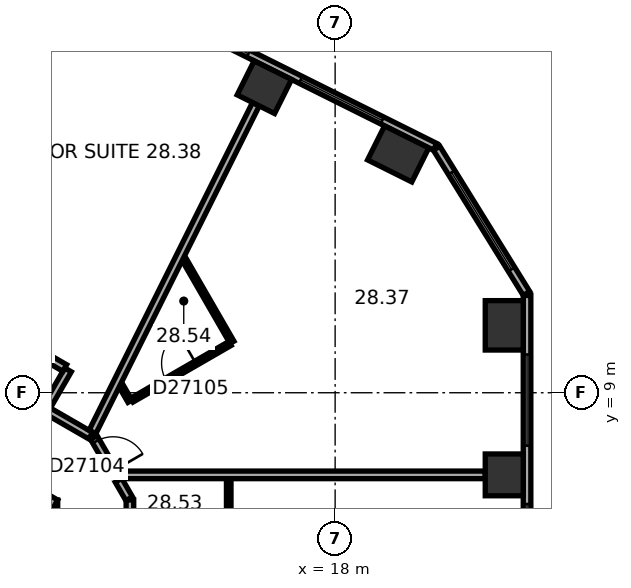
"""IFC4 building model, lengths in metres.
Left out: names, types, materials, properties, quantities, classifications, styles, units other than length and angle.
Written with IfcOpenShell. Run it as: python <this file> out.ifc"""

import sys

from ifc_helpers import new_model, si_unit, direction, frame, frame_2d, origin, origin_2d, place, context, subcontext, project, spatial, rectangle, extrude, element, fill, save


model = new_model("IFC4")
c1 = context("Model", 3, precision=1e-05, world=origin(), true_north=direction((0.0, 1.0)))
c2 = subcontext(c1, "Body", "Model", "MODEL_VIEW")
j1 = project(units=[si_unit("LENGTHUNIT", "METRE"), si_unit("PLANEANGLEUNIT", "RADIAN")], contexts=[c1])
p1 = place(None, origin())
s1 = spatial("IfcSite", under=j1, at=p1, CompositionType="ELEMENT")
p2 = place(p1, origin())
s2 = spatial("IfcBuilding", under=s1, at=p2, CompositionType="ELEMENT")
p3 = place(p2, frame((0.0, 0.0, 116.6)))
s3 = spatial("IfcBuildingStorey", under=s2, at=p3, CompositionType="ELEMENT", Elevation=116.6)
p4 = place(p3, frame((22.45, 6.839, 0.0), z_axis=(0.0, 0.0, 1.0), x_axis=(0.0, 1.0, 0.0)))
e1 = element("IfcColumn", 1, at=p4, inside=s3, PredefinedType="COLUMN", context=c2, shape_type="SweptSolid", body=[
    extrude(rectangle(XDim=1.1, YDim=1.0, at=origin_2d()), origin(), (0.0, 0.0, 1.0), 3.3),
])
for number, where, z_axis, x_axis in (
    (2, (22.45, 10.774, 0.0), (0.0, 0.0, 1.0), (0.0, 1.0, 0.0)),
    (3, (19.659, 15.284, 0.0), (0.0, 0.0, 1.0), (-0.895, 0.446, 0.0)),
):
    element("IfcColumn", number, at=place(p3, frame(where, z_axis=z_axis, x_axis=x_axis)), inside=s3, PredefinedType="COLUMN", context=c2, shape_type="SweptSolid", body=[
        extrude(rectangle(XDim=1.3, YDim=1.0, at=origin_2d()), origin(), (0.0, 0.0, 1.0), 3.3),
    ])
p5 = place(p3, frame((16.138, 17.04, 0.0), z_axis=(0.0, 0.0, 1.0), x_axis=(-0.894934361602, 0.44619781311, 0.0)))
e4 = element("IfcColumn", 4, at=p5, inside=s3, PredefinedType="COLUMN", context=c2, shape_type="SweptSolid", body=[
    extrude(rectangle(XDim=1.1, YDim=1.0, at=origin_2d()), origin(), (0.0, 0.0, 1.0), 3.3),
])
p6 = place(p3, frame((10.1, -6.177, 0.0), z_axis=(0.0, 0.0, 1.0), x_axis=(0.0, 1.0, 0.0)))
e5 = element("IfcWall", 5, at=p6, inside=s3, PredefinedType="SHEAR", context=c2, shape_type="SweptSolid", body=[
    extrude(rectangle(XDim=12.355, YDim=1.2, at=frame_2d((6.177, 0.0))), origin(), (0.0, 0.0, 1.0), 3.3),
])
p7 = place(p6, frame((6.378, 0.0, 0.0)))
e6 = element("IfcOpeningElement", 6, at=p7, cuts=e5, PredefinedType="OPENING", context=c2, shape_type="SweptSolid", body=[
    extrude(rectangle(XDim=1.5, YDim=2.1, at=frame_2d((0.75, 1.05))), frame((0.0, 0.61, 0.0), z_axis=(0.0, -1.0, 0.0), x_axis=(1.0, 0.0, 0.0)), (0.0, 0.0, 1.0), 1.22),
])
p8 = place(p6, frame((1.828, 0.0, 0.0)))
e7 = element("IfcOpeningElement", 7, at=p8, cuts=e5, PredefinedType="OPENING", context=c2, shape_type="SweptSolid", body=[
    extrude(rectangle(XDim=1.1, YDim=2.1, at=frame_2d((0.55, 1.05))), frame((0.0, 0.61, 0.0), z_axis=(0.0, -1.0, 0.0), x_axis=(1.0, 0.0, 0.0)), (0.0, 0.0, 1.0), 1.22),
])
p9 = place(p6, frame((4.427, 0.0, 0.0)))
e8 = element("IfcOpeningElement", 8, at=p9, cuts=e5, PredefinedType="OPENING", context=c2, shape_type="SweptSolid", body=[
    extrude(rectangle(XDim=1.1, YDim=2.1, at=frame_2d((0.55, 1.05))), frame((0.0, 0.61, 0.0), z_axis=(0.0, -1.0, 0.0), x_axis=(1.0, 0.0, 0.0)), (0.0, 0.0, 1.0), 1.22),
])
p10 = place(p3, frame((10.4, 5.658, 0.0), z_axis=(0.0, 0.0, 1.0), x_axis=(-0.866021384402, 0.500006961711, 0.0)))
e9 = element("IfcWall", 9, at=p10, inside=s3, PredefinedType="SHEAR", context=c2, shape_type="SweptSolid", body=[
    extrude(rectangle(XDim=12.355, YDim=1.2, at=frame_2d((6.178, 0.0))), origin(), (0.0, 0.0, 1.0), 3.3),
])
p11 = place(p10, frame((2.728, 0.0, 0.0)))
e10 = element("IfcOpeningElement", 10, at=p11, cuts=e9, PredefinedType="OPENING", context=c2, shape_type="SweptSolid", body=[
    extrude(rectangle(XDim=1.1, YDim=2.1, at=frame_2d((0.55, 1.05))), frame((0.0, 0.61, 0.0), z_axis=(0.0, -1.0, 0.0), x_axis=(1.0, 0.0, 0.0)), (0.0, 0.0, 1.0), 1.22),
])
p12 = place(p10, frame((5.328, 0.0, 0.0)))
e11 = element("IfcOpeningElement", 11, at=p12, cuts=e9, PredefinedType="OPENING", context=c2, shape_type="SweptSolid", body=[
    extrude(rectangle(XDim=1.1, YDim=2.1, at=frame_2d((0.55, 1.05))), frame((0.0, 0.61, 0.0), z_axis=(0.0, -1.0, 0.0), x_axis=(1.0, 0.0, 0.0)), (0.0, 0.0, 1.0), 1.22),
])
p13 = place(p10, frame((7.928, 0.0, 0.0)))
e12 = element("IfcOpeningElement", 12, at=p13, cuts=e9, PredefinedType="OPENING", context=c2, shape_type="SweptSolid", body=[
    extrude(rectangle(XDim=1.1, YDim=2.1, at=frame_2d((0.55, 1.05))), frame((0.0, 0.61, 0.0), z_axis=(0.0, -1.0, 0.0), x_axis=(1.0, 0.0, 0.0)), (0.0, 0.0, 1.0), 1.22),
])
p14 = place(p3, frame((23.05, -9.687, 0.0), z_axis=(0.0, 0.0, 1.0), x_axis=(0.0, 1.0, 0.0)))
e13 = element("IfcWall", 13, at=p14, inside=s3, PredefinedType="STANDARD", context=c2, shape_type="SweptSolid", body=[
    extrude(rectangle(XDim=21.246, YDim=0.2, at=frame_2d((10.623, 0.0))), origin(), (0.0, 0.0, 1.0), 3.3),
])
p15 = place(p14, frame((1.555, 0.0, 0.8)))
e14 = element("IfcOpeningElement", 14, at=p15, cuts=e13, PredefinedType="OPENING", context=c2, shape_type="SweptSolid", body=[
    extrude(rectangle(XDim=2.4, YDim=1.7, at=frame_2d((1.2, 0.85))), frame((0.0, 0.11, 0.0), z_axis=(0.0, -1.0, 0.0), x_axis=(1.0, 0.0, 0.0)), (0.0, 0.0, 1.0), 0.22),
])
p16 = place(p14, frame((5.489, 0.0, 0.8)))
e15 = element("IfcOpeningElement", 15, at=p16, cuts=e13, PredefinedType="OPENING", context=c2, shape_type="SweptSolid", body=[
    extrude(rectangle(XDim=2.4, YDim=1.7, at=frame_2d((1.2, 0.85))), frame((0.0, 0.11, 0.0), z_axis=(0.0, -1.0, 0.0), x_axis=(1.0, 0.0, 0.0)), (0.0, 0.0, 1.0), 0.22),
])
p17 = place(p14, frame((9.424, 0.0, 0.8)))
e16 = element("IfcOpeningElement", 16, at=p17, cuts=e13, PredefinedType="OPENING", context=c2, shape_type="SweptSolid", body=[
    extrude(rectangle(XDim=2.4, YDim=1.7, at=frame_2d((1.2, 0.85))), frame((0.0, 0.11, 0.0), z_axis=(0.0, -1.0, 0.0), x_axis=(1.0, 0.0, 0.0)), (0.0, 0.0, 1.0), 0.22),
])
p18 = place(p14, frame((13.358, 0.0, 0.8)))
e17 = element("IfcOpeningElement", 17, at=p18, cuts=e13, PredefinedType="OPENING", context=c2, shape_type="SweptSolid", body=[
    extrude(rectangle(XDim=2.4, YDim=1.7, at=frame_2d((1.2, 0.85))), frame((0.0, 0.11, 0.0), z_axis=(0.0, -1.0, 0.0), x_axis=(1.0, 0.0, 0.0)), (0.0, 0.0, 1.0), 0.22),
])
p19 = place(p14, frame((17.293, 0.0, 0.8)))
e18 = element("IfcOpeningElement", 18, at=p19, cuts=e13, PredefinedType="OPENING", context=c2, shape_type="SweptSolid", body=[
    extrude(rectangle(XDim=2.4, YDim=1.7, at=frame_2d((1.2, 0.85))), frame((0.0, 0.11, 0.0), z_axis=(0.0, -1.0, 0.0), x_axis=(1.0, 0.0, 0.0)), (0.0, 0.0, 1.0), 0.22),
])
p20 = place(p3, frame((23.035, 11.612, 0.0), z_axis=(0.0, 0.0, 1.0), x_axis=(-0.526160091227, 0.850385535155, 0.0)))
e19 = element("IfcWall", 19, at=p20, inside=s3, PredefinedType="STANDARD", context=c2, shape_type="SweptSolid", body=[
    extrude(rectangle(XDim=4.494, YDim=0.2, at=frame_2d((2.247, 0.0))), origin(), (0.0, 0.0, 1.0), 3.3),
])
p21 = place(p20, frame((0.747, 0.0, 0.8)))
e20 = element("IfcOpeningElement", 20, at=p21, cuts=e19, PredefinedType="OPENING", context=c2, shape_type="SweptSolid", body=[
    extrude(rectangle(XDim=3.0, YDim=1.7, at=frame_2d((1.5, 0.85))), frame((0.0, 0.11, 0.0), z_axis=(0.0, -1.0, 0.0), x_axis=(1.0, 0.0, 0.0)), (0.0, 0.0, 1.0), 0.22),
])
p22 = place(p3, frame((20.63, 15.47, 0.0), z_axis=(0.0, 0.0, 1.0), x_axis=(-0.894934518609, 0.446197498203, 0.0)))
e21 = element("IfcWall", 21, at=p22, inside=s3, PredefinedType="STANDARD", context=c2, shape_type="SweptSolid", body=[
    extrude(rectangle(XDim=21.246, YDim=0.2, at=frame_2d((10.623, 0.0))), origin(), (0.0, 0.0, 1.0), 3.3),
])
p23 = place(p22, frame((1.553, 0.0, 0.8)))
e22 = element("IfcOpeningElement", 22, at=p23, cuts=e21, PredefinedType="OPENING", context=c2, shape_type="SweptSolid", body=[
    extrude(rectangle(XDim=2.4, YDim=1.7, at=frame_2d((1.2, 0.85))), frame((0.0, 0.11, 0.0), z_axis=(0.0, -1.0, 0.0), x_axis=(1.0, 0.0, 0.0)), (0.0, 0.0, 1.0), 0.22),
])
p24 = place(p22, frame((5.488, 0.0, 0.8)))
e23 = element("IfcOpeningElement", 23, at=p24, cuts=e21, PredefinedType="OPENING", context=c2, shape_type="SweptSolid", body=[
    extrude(rectangle(XDim=2.4, YDim=1.7, at=frame_2d((1.2, 0.85))), frame((0.0, 0.11, 0.0), z_axis=(0.0, -1.0, 0.0), x_axis=(1.0, 0.0, 0.0)), (0.0, 0.0, 1.0), 0.22),
])
p25 = place(p22, frame((9.422, 0.0, 0.8)))
e24 = element("IfcOpeningElement", 24, at=p25, cuts=e21, PredefinedType="OPENING", context=c2, shape_type="SweptSolid", body=[
    extrude(rectangle(XDim=2.4, YDim=1.7, at=frame_2d((1.2, 0.85))), frame((0.0, 0.11, 0.0), z_axis=(0.0, -1.0, 0.0), x_axis=(1.0, 0.0, 0.0)), (0.0, 0.0, 1.0), 0.22),
])
p26 = place(p22, frame((13.357, 0.0, 0.8)))
e25 = element("IfcOpeningElement", 25, at=p26, cuts=e21, PredefinedType="OPENING", context=c2, shape_type="SweptSolid", body=[
    extrude(rectangle(XDim=2.4, YDim=1.7, at=frame_2d((1.2, 0.85))), frame((0.0, 0.11, 0.0), z_axis=(0.0, -1.0, 0.0), x_axis=(1.0, 0.0, 0.0)), (0.0, 0.0, 1.0), 0.22),
])
p27 = place(p22, frame((17.292, 0.0, 0.8)))
e26 = element("IfcOpeningElement", 26, at=p27, cuts=e21, PredefinedType="OPENING", context=c2, shape_type="SweptSolid", body=[
    extrude(rectangle(XDim=2.4, YDim=1.7, at=frame_2d((1.2, 0.85))), frame((0.0, 0.11, 0.0), z_axis=(0.0, -1.0, 0.0), x_axis=(1.0, 0.0, 0.0)), (0.0, 0.0, 1.0), 0.22),
])
p28 = place(p3, frame((10.371, 8.561, 0.0), z_axis=(0.0, 0.0, 1.0), x_axis=(0.499986357472, 0.866033280158, 0.0)))
e27 = element("IfcWall", 27, at=p28, inside=s3, PredefinedType="PARTITIONING", context=c2, shape_type="SweptSolid", body=[
    extrude(rectangle(XDim=1.201, YDim=0.2, at=frame_2d((0.601, 0.0))), origin(), (0.0, 0.0, 1.0), 2.95),
])
p29 = place(p3, frame((10.885, 9.652, 0.0), z_axis=(0.0, 0.0, 1.0), x_axis=(-0.866033868542, 0.499985338323, 0.0)))
e28 = element("IfcWall", 28, at=p29, inside=s3, PredefinedType="PARTITIONING", context=c2, shape_type="SweptSolid", body=[
    extrude(rectangle(XDim=8.602, YDim=0.2, at=frame_2d((4.301, 0.0))), origin(), (0.0, 0.0, 1.0), 2.95),
])
p30 = place(p29, frame((1.464, 0.0, 0.0)))
e29 = element("IfcOpeningElement", 29, at=p30, cuts=e28, PredefinedType="OPENING", context=c2, shape_type="SweptSolid", body=[
    extrude(rectangle(XDim=0.9, YDim=2.1, at=frame_2d((0.45, 1.05))), frame((0.0, 0.11, 0.0), z_axis=(0.0, -1.0, 0.0), x_axis=(1.0, 0.0, 0.0)), (0.0, 0.0, 1.0), 0.22),
])
p31 = place(p29, frame((7.09, 0.0, 0.0)))
e30 = element("IfcOpeningElement", 30, at=p31, cuts=e28, PredefinedType="OPENING", context=c2, shape_type="SweptSolid", body=[
    extrude(rectangle(XDim=0.9, YDim=2.1, at=frame_2d((0.45, 1.05))), frame((0.0, 0.11, 0.0), z_axis=(0.0, -1.0, 0.0), x_axis=(1.0, 0.0, 0.0)), (0.0, 0.0, 1.0), 0.22),
])
p32 = place(p3, frame((11.566, 7.871, 0.0), z_axis=(0.0, 0.0, 1.0), x_axis=(-0.866004557827, 0.500036104519, 0.0)))
e31 = element("IfcWall", 31, at=p32, inside=s3, PredefinedType="PARTITIONING", context=c2, shape_type="SweptSolid", body=[
    extrude(rectangle(XDim=1.28, YDim=0.2, at=frame_2d((0.64, 0.0))), origin(), (0.0, 0.0, 1.0), 2.95),
])
p33 = place(p3, frame((12.218, 6.839, 0.0), z_axis=(0.0, 0.0, 1.0), x_axis=(-0.500044870432, 0.865999496279, 0.0)))
e32 = element("IfcWall", 32, at=p33, inside=s3, PredefinedType="PARTITIONING", context=c2, shape_type="SweptSolid", body=[
    extrude(rectangle(XDim=1.136, YDim=0.2, at=frame_2d((0.568, 0.0))), origin(), (0.0, 0.0, 1.0), 2.95),
])
p34 = place(p33, frame((0.118, 0.0, 0.0)))
e33 = element("IfcOpeningElement", 33, at=p34, cuts=e32, PredefinedType="OPENING", context=c2, shape_type="SweptSolid", body=[
    extrude(rectangle(XDim=0.9, YDim=2.1, at=frame_2d((0.45, 1.05))), frame((0.0, 0.11, 0.0), z_axis=(0.0, -1.0, 0.0), x_axis=(1.0, 0.0, 0.0)), (0.0, 0.0, 1.0), 0.22),
])
p35 = place(p3, frame((12.58, 6.212, 0.0), z_axis=(0.0, 0.0, 1.0), x_axis=(-0.499936258447, 0.86606220186, 0.0)))
e34 = element("IfcWall", 34, at=p35, inside=s3, PredefinedType="PARTITIONING", context=c2, shape_type="SweptSolid", body=[
    extrude(rectangle(XDim=0.56, YDim=0.2, at=frame_2d((0.28, 0.0))), origin(), (0.0, 0.0, 1.0), 2.95),
])
p36 = place(p3, frame((12.6, 3.004, 0.0), z_axis=(0.0, 0.0, 1.0), x_axis=(0.0, 1.0, 0.0)))
e35 = element("IfcWall", 35, at=p36, inside=s3, PredefinedType="PARTITIONING", context=c2, shape_type="SweptSolid", body=[
    extrude(rectangle(XDim=3.173, YDim=0.2, at=frame_2d((1.586, 0.0))), origin(), (0.0, 0.0, 1.0), 2.95),
])
p37 = place(p36, frame((0.225, 0.0, 0.0)))
e36 = element("IfcOpeningElement", 36, at=p37, cuts=e35, PredefinedType="OPENING", context=c2, shape_type="SweptSolid", body=[
    extrude(rectangle(XDim=0.9, YDim=2.1, at=frame_2d((0.45, 1.05))), frame((0.0, 0.11, 0.0), z_axis=(0.0, -1.0, 0.0), x_axis=(1.0, 0.0, 0.0)), (0.0, 0.0, 1.0), 0.22),
])
p38 = place(p3, frame((12.601, 8.776, 0.0), z_axis=(0.0, 0.0, 1.0), x_axis=(-0.500166486798, 0.865929261247, 0.0)))
e37 = element("IfcWall", 37, at=p38, inside=s3, PredefinedType="PARTITIONING", context=c2, shape_type="SweptSolid", body=[
    extrude(rectangle(XDim=0.476, YDim=0.12, at=frame_2d((0.238, 0.0))), origin(), (0.0, 0.0, 1.0), 2.95),
])
p39 = place(p3, frame((14.022, 12.515, 0.0), z_axis=(0.0, 0.0, 1.0), x_axis=(0.499962146402, -0.866047257466, 0.0)))
e38 = element("IfcWall", 38, at=p39, inside=s3, PredefinedType="PARTITIONING", context=c2, shape_type="SweptSolid", body=[
    extrude(rectangle(XDim=2.528, YDim=0.12, at=frame_2d((1.264, 0.0))), origin(), (0.0, 0.0, 1.0), 2.95),
])
p40 = place(p3, frame((15.2, 6.739, 0.0), z_axis=(0.0, 0.0, 1.0), x_axis=(0.0, -1.0, 0.0)))
e39 = element("IfcWall", 39, at=p40, inside=s3, PredefinedType="PARTITIONING", context=c2, shape_type="SweptSolid", body=[
    extrude(rectangle(XDim=2.274, YDim=0.12, at=frame_2d((1.137, 0.0))), origin(), (0.0, 0.0, 1.0), 2.95),
])
p41 = place(p3, frame((15.233, 10.296, 0.0), z_axis=(0.0, 0.0, 1.0), x_axis=(-0.866010940986, -0.500025049464, 0.0)))
e40 = element("IfcWall", 40, at=p41, inside=s3, PredefinedType="PARTITIONING", context=c2, shape_type="SweptSolid", body=[
    extrude(rectangle(XDim=2.98, YDim=0.12, at=frame_2d((1.49, 0.0))), origin(), (0.0, 0.0, 1.0), 2.95),
])
p42 = place(p41, frame((1.04, 0.0, 0.0)))
e41 = element("IfcOpeningElement", 41, at=p42, cuts=e40, PredefinedType="OPENING", context=c2, shape_type="SweptSolid", body=[
    extrude(rectangle(XDim=0.9, YDim=2.1, at=frame_2d((0.45, 1.05))), frame((0.0, 0.07, 0.0), z_axis=(0.0, -1.0, 0.0), x_axis=(1.0, 0.0, 0.0)), (0.0, 0.0, 1.0), 0.14),
])
p43 = place(p3, frame((15.915, 16.592, 0.0), z_axis=(0.0, 0.0, 1.0), x_axis=(-0.446199736347, -0.894933402709, 0.0)))
e42 = element("IfcWall", 42, at=p43, inside=s3, PredefinedType="PARTITIONING", context=c2, shape_type="SweptSolid", body=[
    extrude(rectangle(XDim=9.635, YDim=0.2, at=frame_2d((4.817, 0.0))), origin(), (0.0, 0.0, 1.0), 2.95),
])
p44 = place(p3, frame((21.95, 6.839, 0.0), z_axis=(0.0, 0.0, 1.0), x_axis=(-1.0, 0.0, 0.0)))
e43 = element("IfcWall", 43, at=p44, inside=s3, PredefinedType="PARTITIONING", context=c2, shape_type="SweptSolid", body=[
    extrude(rectangle(XDim=9.65, YDim=0.2, at=frame_2d((4.825, 0.0))), origin(), (0.0, 0.0, 1.0), 2.95),
])
p45 = place(p18, origin())
e44 = element("IfcWindow", 44, at=p45, inside=s3, PartitioningType="SINGLE_PANEL", PredefinedType="WINDOW", context=c2, shape_type="SweptSolid", body=[
    extrude(rectangle(XDim=2.4, YDim=1.7, at=frame_2d((1.2, 0.85))), frame((0.0, 0.03, 0.0), z_axis=(0.0, -1.0, 0.0), x_axis=(1.0, 0.0, 0.0)), (0.0, 0.0, 1.0), 0.06),
])
fill(e17, e44)
p46 = place(p19, origin())
e45 = element("IfcWindow", 45, at=p46, inside=s3, PartitioningType="SINGLE_PANEL", PredefinedType="WINDOW", context=c2, shape_type="SweptSolid", body=[
    extrude(rectangle(XDim=2.4, YDim=1.7, at=frame_2d((1.2, 0.85))), frame((0.0, 0.03, 0.0), z_axis=(0.0, -1.0, 0.0), x_axis=(1.0, 0.0, 0.0)), (0.0, 0.0, 1.0), 0.06),
])
fill(e18, e45)
p47 = place(p21, origin())
e46 = element("IfcWindow", 46, at=p47, inside=s3, PartitioningType="SINGLE_PANEL", PredefinedType="WINDOW", context=c2, shape_type="SweptSolid", body=[
    extrude(rectangle(XDim=3.0, YDim=1.7, at=frame_2d((1.5, 0.85))), frame((0.0, 0.03, 0.0), z_axis=(0.0, -1.0, 0.0), x_axis=(1.0, 0.0, 0.0)), (0.0, 0.0, 1.0), 0.06),
])
fill(e20, e46)
p48 = place(p23, origin())
e47 = element("IfcWindow", 47, at=p48, inside=s3, PartitioningType="SINGLE_PANEL", PredefinedType="WINDOW", context=c2, shape_type="SweptSolid", body=[
    extrude(rectangle(XDim=2.4, YDim=1.7, at=frame_2d((1.2, 0.85))), frame((0.0, 0.03, 0.0), z_axis=(0.0, -1.0, 0.0), x_axis=(1.0, 0.0, 0.0)), (0.0, 0.0, 1.0), 0.06),
])
fill(e22, e47)
p49 = place(p24, origin())
e48 = element("IfcWindow", 48, at=p49, inside=s3, PartitioningType="SINGLE_PANEL", PredefinedType="WINDOW", context=c2, shape_type="SweptSolid", body=[
    extrude(rectangle(XDim=2.4, YDim=1.7, at=frame_2d((1.2, 0.85))), frame((0.0, 0.03, 0.0), z_axis=(0.0, -1.0, 0.0), x_axis=(1.0, 0.0, 0.0)), (0.0, 0.0, 1.0), 0.06),
])
fill(e23, e48)
p50 = place(p34, origin())
e49 = element("IfcDoor", 49, at=p50, inside=s3, OperationType="SINGLE_SWING_LEFT", PredefinedType="DOOR", context=c2, shape_type="SweptSolid", body=[
    extrude(rectangle(XDim=0.9, YDim=2.1, at=frame_2d((0.45, 1.05))), frame((0.0, 0.025, 0.0), z_axis=(0.0, -1.0, 0.0), x_axis=(1.0, 0.0, 0.0)), (0.0, 0.0, 1.0), 0.05),
])
fill(e33, e49)
p51 = place(p42, origin())
e50 = element("IfcDoor", 50, at=p51, inside=s3, OperationType="SINGLE_SWING_LEFT", PredefinedType="DOOR", context=c2, shape_type="SweptSolid", body=[
    extrude(rectangle(XDim=0.9, YDim=2.1, at=frame_2d((0.45, 1.05))), frame((0.0, 0.025, 0.0), z_axis=(0.0, -1.0, 0.0), x_axis=(1.0, 0.0, 0.0)), (0.0, 0.0, 1.0), 0.05),
])
fill(e41, e50)
save(model, sys.argv[1])
